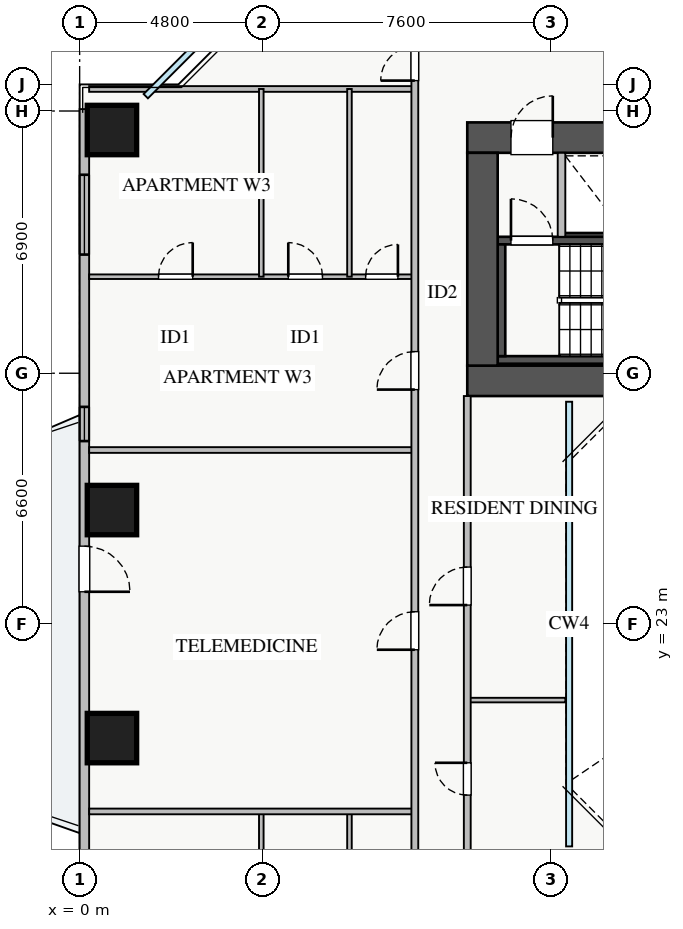
"""IFC4 building model, lengths in metres.
Left out: names, types, materials, properties, quantities, classifications, styles, units other than length and angle.
Written with IfcOpenShell. Run it as: python <this file> out.ifc"""

import sys

from ifc_helpers import new_model, si_unit, direction, frame, frame_2d, origin, origin_2d, place, context, subcontext, project, spatial, rectangle, extrude, source, transform, mapped, element, fill, save


model = new_model("IFC4")
c1 = context("Model", 3, precision=1e-05, world=origin(), true_north=direction((0.0, 1.0)))
c2 = subcontext(c1, "Body", "Model", "MODEL_VIEW")
j1 = project(units=[si_unit("LENGTHUNIT", "METRE"), si_unit("PLANEANGLEUNIT", "RADIAN")], contexts=[c1])
p1 = place(None, origin())
s1 = spatial("IfcSite", under=j1, at=p1, CompositionType="ELEMENT")
p2 = place(p1, origin())
s2 = spatial("IfcBuilding", under=s1, at=p2, CompositionType="ELEMENT")
p3 = place(p2, frame((0.0, 0.0, 50.25)))
s3 = spatial("IfcBuildingStorey", under=s2, at=p3, CompositionType="ELEMENT", Elevation=50.25)
p4 = place(p3, frame((12.68, 33.2, 0.0), z_axis=(0.0, 0.0, 1.0), x_axis=(1.0, 0.0, 0.0)))
e1 = element("IfcWall", 1, at=p4, inside=s3, PredefinedType="SHEAR", context=c2, shape_type="SweptSolid", body=[
    extrude(rectangle(XDim=1.94, YDim=0.18, at=frame_2d((0.97, 0.0))), origin(), (0.0, 0.0, 1.0), 3.07),
])
p5 = place(p3, frame((11.0, 29.95, 0.0), z_axis=(0.0, 0.0, 1.0), x_axis=(1.0, 0.0, 0.0)))
e2 = element("IfcWall", 2, at=p5, inside=s3, PredefinedType="SHEAR", context=c2, shape_type="SweptSolid", body=[
    extrude(rectangle(XDim=7.15, YDim=0.2, at=frame_2d((3.575, 0.0))), origin(), (0.0, 0.0, 1.0), 3.25),
])
p6 = place(p3, frame((11.0, 33.09, 0.0), z_axis=(0.0, 0.0, 1.0), x_axis=(1.0, 0.0, 0.0)))
e3 = element("IfcWall", 3, at=p6, inside=s3, PredefinedType="SHEAR", context=c2, shape_type="SweptSolid", body=[
    extrude(rectangle(XDim=7.15, YDim=0.2, at=frame_2d((3.575, 0.0))), origin(), (0.0, 0.0, 1.0), 3.25),
])
p7 = place(p6, frame((0.35, 0.0, 0.0)))
e4 = element("IfcOpeningElement", 4, at=p7, cuts=e3, PredefinedType="OPENING", context=c2, shape_type="SweptSolid", body=[
    extrude(rectangle(XDim=1.1, YDim=2.05, at=frame_2d((0.55, 1.025))), frame((0.0, 0.11, 0.0), z_axis=(0.0, -1.0, 0.0), x_axis=(1.0, 0.0, 0.0)), (0.0, 0.0, 1.0), 0.22),
])
p8 = place(p3, frame((11.1, 30.05, 0.0), z_axis=(0.0, 0.0, 1.0), x_axis=(0.0, 1.0, 0.0)))
e5 = element("IfcWall", 5, at=p8, inside=s3, PredefinedType="SHEAR", context=c2, shape_type="SweptSolid", body=[
    extrude(rectangle(XDim=2.94, YDim=0.2, at=frame_2d((1.47, 0.0))), origin(), (0.0, 0.0, 1.0), 3.25),
])
p9 = place(p3, frame((10.2, 29.4, 0.0), z_axis=(0.0, 0.0, 1.0), x_axis=(1.0, 0.0, 0.0)))
e6 = element("IfcWall", 6, at=p9, inside=s3, PredefinedType="SHEAR", context=c2, shape_type="SweptSolid", body=[
    extrude(rectangle(XDim=17.6, YDim=0.8, at=frame_2d((8.8, 0.0))), origin(), (0.0, 0.0, 1.0), 3.25),
])
p10 = place(p3, frame((10.2, 35.8, 0.0), z_axis=(0.0, 0.0, 1.0), x_axis=(1.0, 0.0, 0.0)))
e7 = element("IfcWall", 7, at=p10, inside=s3, PredefinedType="SHEAR", context=c2, shape_type="SweptSolid", body=[
    extrude(rectangle(XDim=17.6, YDim=0.8, at=frame_2d((8.8, 0.0))), origin(), (0.0, 0.0, 1.0), 3.25),
])
p11 = place(p10, frame((1.15, 0.0, 0.0)))
e8 = element("IfcOpeningElement", 8, at=p11, cuts=e7, PredefinedType="OPENING", context=c2, shape_type="SweptSolid", body=[
    extrude(rectangle(XDim=1.1, YDim=2.05, at=frame_2d((0.55, 1.025))), frame((0.0, 0.41, 0.0), z_axis=(0.0, -1.0, 0.0), x_axis=(1.0, 0.0, 0.0)), (0.0, 0.0, 1.0), 0.82),
])
p12 = place(p10, frame((8.3, 0.0, 0.0)))
e9 = element("IfcOpeningElement", 9, at=p12, cuts=e7, PredefinedType="OPENING", context=c2, shape_type="SweptSolid", body=[
    extrude(rectangle(XDim=1.1, YDim=2.05, at=frame_2d((0.55, 1.025))), frame((0.0, 0.41, 0.0), z_axis=(0.0, -1.0, 0.0), x_axis=(1.0, 0.0, 0.0)), (0.0, 0.0, 1.0), 0.82),
])
p13 = place(p10, frame((10.05, 0.0, 0.0)))
e10 = element("IfcOpeningElement", 10, at=p13, cuts=e7, PredefinedType="OPENING", context=c2, shape_type="SweptSolid", body=[
    extrude(rectangle(XDim=1.1, YDim=2.05, at=frame_2d((0.55, 1.025))), frame((0.0, 0.41, 0.0), z_axis=(0.0, -1.0, 0.0), x_axis=(1.0, 0.0, 0.0)), (0.0, 0.0, 1.0), 0.82),
])
p14 = place(p10, frame((14.74, 0.0, 0.0)))
e11 = element("IfcOpeningElement", 11, at=p14, cuts=e7, PredefinedType="OPENING", context=c2, shape_type="SweptSolid", body=[
    extrude(rectangle(XDim=1.0, YDim=2.05, at=frame_2d((0.5, 1.025))), frame((0.0, 0.41, 0.0), z_axis=(0.0, -1.0, 0.0), x_axis=(1.0, 0.0, 0.0)), (0.0, 0.0, 1.0), 0.82),
])
p15 = place(p10, frame((11.835, 0.0, 0.0)))
e12 = element("IfcOpeningElement", 12, at=p15, cuts=e7, PredefinedType="OPENING", context=c2, shape_type="SweptSolid", body=[
    extrude(rectangle(XDim=1.0, YDim=2.05, at=frame_2d((0.5, 1.025))), frame((0.0, 0.41, 0.0), z_axis=(0.0, -1.0, 0.0), x_axis=(1.0, 0.0, 0.0)), (0.0, 0.0, 1.0), 0.82),
])
p16 = place(p10, frame((13.37, 0.0, 0.0)))
e13 = element("IfcOpeningElement", 13, at=p16, cuts=e7, PredefinedType="OPENING", context=c2, shape_type="SweptSolid", body=[
    extrude(rectangle(XDim=1.0, YDim=2.05, at=frame_2d((0.5, 1.025))), frame((0.0, 0.41, 0.0), z_axis=(0.0, -1.0, 0.0), x_axis=(1.0, 0.0, 0.0)), (0.0, 0.0, 1.0), 0.82),
])
p17 = place(p3, frame((10.6, 29.8, 0.0), z_axis=(0.0, 0.0, 1.0), x_axis=(0.0, 1.0, 0.0)))
e14 = element("IfcWall", 14, at=p17, inside=s3, PredefinedType="SHEAR", context=c2, shape_type="SweptSolid", body=[
    extrude(rectangle(XDim=5.6, YDim=0.8, at=frame_2d((2.8, 0.0))), origin(), (0.0, 0.0, 1.0), 3.25),
])
m1 = source(origin(), c2, "Body", "SweptSolid", [
    extrude(rectangle(XDim=1.3, YDim=1.3, at=origin_2d()), origin(), (0.0, 0.0, 1.0), 3.25),
])
for number, where, z_axis, x_axis in (
    (15, (0.85, 36.0, 0.0), (0.0, 0.0, 1.0), (1.0, 0.0, 0.0)),
    (16, (0.85, 26.0, 0.0), (0.0, 0.0, 1.0), (1.0, 0.0, 0.0)),
    (17, (0.85, 20.0, 0.0), (0.0, 0.0, 1.0), (1.0, 0.0, 0.0)),
):
    element("IfcColumn", number, at=place(p3, frame(where, z_axis=z_axis, x_axis=x_axis)), inside=s3, PredefinedType="COLUMN", context=c2, shape_type="MappedRepresentation", body=[
        mapped(m1, transform((0.0, 0.0, 0.0), x_axis=(1.0, 0.0, 0.0), y_axis=(0.0, 1.0, 0.0), z_axis=(0.0, 0.0, 1.0), scale=1.0)),
    ])
p18 = place(p3, frame((0.125, 9.45, 0.0), z_axis=(0.0, 0.0, 1.0), x_axis=(0.0, 1.0, 0.0)))
e18 = element("IfcWall", 18, at=p18, inside=s3, PredefinedType="STANDARD", context=c2, shape_type="SweptSolid", body=[
    extrude(rectangle(XDim=27.1, YDim=0.25, at=frame_2d((13.55, 0.0))), origin(), (0.0, 0.0, 1.0), 2.61),
])
p19 = place(p18, frame((14.4, 0.0, 0.0)))
e19 = element("IfcOpeningElement", 19, at=p19, cuts=e18, PredefinedType="OPENING", context=c2, shape_type="SweptSolid", body=[
    extrude(rectangle(XDim=1.2, YDim=2.1, at=frame_2d((0.6, 1.05))), frame((0.0, 0.135, 0.0), z_axis=(0.0, -1.0, 0.0), x_axis=(1.0, 0.0, 0.0)), (0.0, 0.0, 1.0), 0.27),
])
p20 = place(p18, frame((1.512, 0.0, 0.9)))
e20 = element("IfcOpeningElement", 20, at=p20, cuts=e18, PredefinedType="OPENING", context=c2, shape_type="SweptSolid", body=[
    extrude(rectangle(XDim=1.8, YDim=1.5, at=frame_2d((0.9, 0.75))), frame((0.0, 0.135, 0.0), z_axis=(0.0, -1.0, 0.0), x_axis=(1.0, 0.0, 0.0)), (0.0, 0.0, 1.0), 0.27),
])
p21 = place(p18, frame((23.272, 0.0, 0.9)))
e21 = element("IfcOpeningElement", 21, at=p21, cuts=e18, PredefinedType="OPENING", context=c2, shape_type="SweptSolid", body=[
    extrude(rectangle(XDim=2.1, YDim=1.5, at=frame_2d((1.05, 0.75))), frame((0.0, 0.135, 0.0), z_axis=(0.0, -1.0, 0.0), x_axis=(1.0, 0.0, 0.0)), (0.0, 0.0, 1.0), 0.27),
])
p22 = place(p18, frame((4.942, 0.0, 0.9)))
e22 = element("IfcOpeningElement", 22, at=p22, cuts=e18, PredefinedType="OPENING", context=c2, shape_type="SweptSolid", body=[
    extrude(rectangle(XDim=2.4, YDim=1.5, at=frame_2d((1.2, 0.75))), frame((0.0, 0.135, 0.0), z_axis=(0.0, -1.0, 0.0), x_axis=(1.0, 0.0, 0.0)), (0.0, 0.0, 1.0), 0.27),
])
p23 = place(p18, frame((18.365, 0.0, 0.9)))
e23 = element("IfcOpeningElement", 23, at=p23, cuts=e18, PredefinedType="OPENING", context=c2, shape_type="SweptSolid", body=[
    extrude(rectangle(XDim=0.9, YDim=1.2, at=frame_2d((0.45, 0.6))), frame((0.0, 0.135, 0.0), z_axis=(0.0, -1.0, 0.0), x_axis=(1.0, 0.0, 0.0)), (0.0, 0.0, 1.0), 0.27),
])
p24 = place(p3, frame((12.68, 33.19, 0.0), z_axis=(0.0, 0.0, 1.0), x_axis=(0.0, 1.0, 0.0)))
e24 = element("IfcWall", 24, at=p24, inside=s3, PredefinedType="PARTITIONING", context=c2, shape_type="SweptSolid", body=[
    extrude(rectangle(XDim=2.21, YDim=0.2, at=frame_2d((1.105, 0.0))), origin(), (0.0, 0.0, 1.0), 3.07),
])
p25 = place(p3, frame((0.25, 37.08, 0.0), z_axis=(0.0, 0.0, 1.0), x_axis=(1.0, 0.0, 0.0)))
e25 = element("IfcWall", 25, at=p25, inside=s3, PredefinedType="PARTITIONING", context=c2, shape_type="SweptSolid", body=[
    extrude(rectangle(XDim=8.57, YDim=0.15, at=frame_2d((4.285, 0.0))), origin(), (0.0, 0.0, 1.0), 3.07),
])
for number, where, z_axis, x_axis in (
    (26, (4.78, 13.13, 0.0), (0.0, 0.0, 1.0), (0.0, 1.0, 0.0)),
    (27, (7.1, 13.13, 0.0), (0.0, 0.0, 1.0), (0.0, 1.0, 0.0)),
):
    element("IfcWall", number, at=place(p3, frame(where, z_axis=z_axis, x_axis=x_axis)), inside=s3, PredefinedType="PLUMBINGWALL", context=c2, shape_type="SweptSolid", body=[
        extrude(rectangle(XDim=4.94, YDim=0.12, at=frame_2d((2.47, 0.0))), origin(), (0.0, 0.0, 1.0), 3.07),
    ])
p26 = place(p3, frame((0.25, 18.07, 0.0), z_axis=(0.0, 0.0, 1.0), x_axis=(1.0, 0.0, 0.0)))
e28 = element("IfcWall", 28, at=p26, inside=s3, PredefinedType="PARTITIONING", context=c2, shape_type="SweptSolid", body=[
    extrude(rectangle(XDim=8.57, YDim=0.15, at=frame_2d((4.285, 0.0))), origin(), (0.0, 0.0, 1.0), 2.821),
])
p27 = place(p3, frame((0.25, 32.14, 0.0), z_axis=(0.0, 0.0, 1.0), x_axis=(1.0, 0.0, 0.0)))
e29 = element("IfcWall", 29, at=p27, inside=s3, PredefinedType="PLUMBINGWALL", context=c2, shape_type="SweptSolid", body=[
    extrude(rectangle(XDim=8.57, YDim=0.12, at=frame_2d((4.285, 0.0))), origin(), (0.0, 0.0, 1.0), 3.07),
])
p28 = place(p27, frame((1.825, 0.0, 0.0)))
e30 = element("IfcOpeningElement", 30, at=p28, cuts=e29, PredefinedType="OPENING", context=c2, shape_type="SweptSolid", body=[
    extrude(rectangle(XDim=0.9, YDim=2.05, at=frame_2d((0.45, 1.025))), frame((0.0, 0.07, 0.0), z_axis=(0.0, -1.0, 0.0), x_axis=(1.0, 0.0, 0.0)), (0.0, 0.0, 1.0), 0.14),
])
p29 = place(p27, frame((5.24, 0.0, 0.0)))
e31 = element("IfcOpeningElement", 31, at=p29, cuts=e29, PredefinedType="OPENING", context=c2, shape_type="SweptSolid", body=[
    extrude(rectangle(XDim=0.9, YDim=2.05, at=frame_2d((0.45, 1.025))), frame((0.0, 0.07, 0.0), z_axis=(0.0, -1.0, 0.0), x_axis=(1.0, 0.0, 0.0)), (0.0, 0.0, 1.0), 0.14),
])
p30 = place(p27, frame((7.275, 0.0, 0.0)))
e32 = element("IfcOpeningElement", 32, at=p30, cuts=e29, PredefinedType="OPENING", context=c2, shape_type="SweptSolid", body=[
    extrude(rectangle(XDim=0.85, YDim=2.05, at=frame_2d((0.425, 1.025))), frame((0.0, 0.07, 0.0), z_axis=(0.0, -1.0, 0.0), x_axis=(1.0, 0.0, 0.0)), (0.0, 0.0, 1.0), 0.14),
])
for number, where, z_axis, x_axis in (
    (33, (4.78, 32.14, 0.0), (0.0, 0.0, 1.0), (0.0, 1.0, 0.0)),
    (34, (7.1, 32.14, 0.0), (0.0, 0.0, 1.0), (0.0, 1.0, 0.0)),
):
    element("IfcWall", number, at=place(p3, frame(where, z_axis=z_axis, x_axis=x_axis)), inside=s3, PredefinedType="PLUMBINGWALL", context=c2, shape_type="SweptSolid", body=[
        extrude(rectangle(XDim=4.94, YDim=0.12, at=frame_2d((2.47, 0.0))), origin(), (0.0, 0.0, 1.0), 3.07),
    ])
p31 = place(p3, frame((0.25, 27.58, 0.0), z_axis=(0.0, 0.0, 1.0), x_axis=(1.0, 0.0, 0.0)))
e35 = element("IfcWall", 35, at=p31, inside=s3, PredefinedType="PARTITIONING", context=c2, shape_type="SweptSolid", body=[
    extrude(rectangle(XDim=8.57, YDim=0.15, at=frame_2d((4.285, 0.0))), origin(), (0.0, 0.0, 1.0), 2.821),
])
p32 = place(p3, frame((8.82, 7.21, 0.0), z_axis=(0.0, 0.0, 1.0), x_axis=(0.0, 1.0, 0.0)))
e36 = element("IfcWall", 36, at=p32, inside=s3, PredefinedType="PARTITIONING", context=c2, shape_type="SweptSolid", body=[
    extrude(rectangle(XDim=31.23, YDim=0.18, at=frame_2d((15.615, 0.0))), origin(), (0.0, 0.0, 1.0), 3.07),
])
p33 = place(p32, frame((30.09, 0.0, 0.0)))
e37 = element("IfcOpeningElement", 37, at=p33, cuts=e36, PredefinedType="OPENING", context=c2, shape_type="SweptSolid", body=[
    extrude(rectangle(XDim=0.9, YDim=2.05, at=frame_2d((0.45, 1.025))), frame((0.0, 0.1, 0.0), z_axis=(0.0, -1.0, 0.0), x_axis=(1.0, 0.0, 0.0)), (0.0, 0.0, 1.0), 0.2),
])
p34 = place(p32, frame((0.24, 0.0, 0.0)))
e38 = element("IfcOpeningElement", 38, at=p34, cuts=e36, PredefinedType="OPENING", context=c2, shape_type="SweptSolid", body=[
    extrude(rectangle(XDim=0.9, YDim=2.05, at=frame_2d((0.45, 1.025))), frame((0.0, 0.1, 0.0), z_axis=(0.0, -1.0, 0.0), x_axis=(1.0, 0.0, 0.0)), (0.0, 0.0, 1.0), 0.2),
])
p35 = place(p32, frame((2.95, 0.0, 0.0)))
e39 = element("IfcOpeningElement", 39, at=p35, cuts=e36, PredefinedType="OPENING", context=c2, shape_type="SweptSolid", body=[
    extrude(rectangle(XDim=1.0, YDim=2.05, at=frame_2d((0.5, 1.025))), frame((0.0, 0.1, 0.0), z_axis=(0.0, -1.0, 0.0), x_axis=(1.0, 0.0, 0.0)), (0.0, 0.0, 1.0), 0.2),
])
p36 = place(p32, frame((15.115, 0.0, 0.0)))
e40 = element("IfcOpeningElement", 40, at=p36, cuts=e36, PredefinedType="OPENING", context=c2, shape_type="SweptSolid", body=[
    extrude(rectangle(XDim=1.0, YDim=2.05, at=frame_2d((0.5, 1.025))), frame((0.0, 0.1, 0.0), z_axis=(0.0, -1.0, 0.0), x_axis=(1.0, 0.0, 0.0)), (0.0, 0.0, 1.0), 0.2),
])
p37 = place(p32, frame((21.96, 0.0, 0.0)))
e41 = element("IfcOpeningElement", 41, at=p37, cuts=e36, PredefinedType="OPENING", context=c2, shape_type="SweptSolid", body=[
    extrude(rectangle(XDim=1.0, YDim=2.05, at=frame_2d((0.5, 1.025))), frame((0.0, 0.1, 0.0), z_axis=(0.0, -1.0, 0.0), x_axis=(1.0, 0.0, 0.0)), (0.0, 0.0, 1.0), 0.2),
])
p38 = place(p3, frame((10.2, 21.0, 0.0), z_axis=(0.0, 0.0, 1.0), x_axis=(1.0, 0.0, 0.0)))
e42 = element("IfcWall", 42, at=p38, inside=s3, PredefinedType="PLUMBINGWALL", context=c2, shape_type="SweptSolid", body=[
    extrude(rectangle(XDim=2.58, YDim=0.12, at=frame_2d((1.29, 0.0))), origin(), (0.0, 0.0, 1.0), 3.07),
])
p39 = place(p3, frame((10.2, 17.0, 0.0), z_axis=(0.0, 0.0, 1.0), x_axis=(0.0, 1.0, 0.0)))
e43 = element("IfcWall", 43, at=p39, inside=s3, PredefinedType="PARTITIONING", context=c2, shape_type="SweptSolid", body=[
    extrude(rectangle(XDim=12.0, YDim=0.18, at=frame_2d((6.0, 0.0))), origin(), (0.0, 0.0, 1.0), 3.07),
])
p40 = place(p39, frame((1.5, 0.0, 0.0)))
e44 = element("IfcOpeningElement", 44, at=p40, cuts=e43, PredefinedType="OPENING", context=c2, shape_type="SweptSolid", body=[
    extrude(rectangle(XDim=0.85, YDim=2.05, at=frame_2d((0.425, 1.025))), frame((0.0, 0.1, 0.0), z_axis=(0.0, -1.0, 0.0), x_axis=(1.0, 0.0, 0.0)), (0.0, 0.0, 1.0), 0.2),
])
p41 = place(p39, frame((6.5, 0.0, 0.0)))
e45 = element("IfcOpeningElement", 45, at=p41, cuts=e43, PredefinedType="OPENING", context=c2, shape_type="SweptSolid", body=[
    extrude(rectangle(XDim=1.0, YDim=2.05, at=frame_2d((0.5, 1.025))), frame((0.0, 0.1, 0.0), z_axis=(0.0, -1.0, 0.0), x_axis=(1.0, 0.0, 0.0)), (0.0, 0.0, 1.0), 0.2),
])
m2 = source(origin(), c2, "Body", "SweptSolid", [
    extrude(rectangle(XDim=1.2, YDim=2.1, at=frame_2d((0.6, 1.05))), frame((0.0, 0.025, 0.0), z_axis=(0.0, -1.0, 0.0), x_axis=(1.0, 0.0, 0.0)), (0.0, 0.0, 1.0), 0.05),
])
p42 = place(p19, frame((1.2, 0.0, 0.0), z_axis=(0.0, 0.0, 1.0), x_axis=(-1.0, 0.0, 0.0)))
e46 = element("IfcDoor", 46, at=p42, inside=s3, OperationType="SINGLE_SWING_LEFT", PredefinedType="DOOR", context=c2, shape_type="MappedRepresentation", body=[
    mapped(m2, transform((0.0, 0.0, 0.0), x_axis=(1.0, 0.0, 0.0), y_axis=(0.0, 1.0, 0.0), z_axis=(0.0, 0.0, 1.0), scale=1.0)),
])
fill(e19, e46)
m3 = source(origin(), c2, "Body", "SweptSolid", [
    extrude(rectangle(XDim=2.1, YDim=1.5, at=frame_2d((1.05, 0.75))), frame((0.0, 0.03, 0.0), z_axis=(0.0, -1.0, 0.0), x_axis=(1.0, 0.0, 0.0)), (0.0, 0.0, 1.0), 0.06),
])
p43 = place(p21, origin())
e47 = element("IfcWindow", 47, at=p43, inside=s3, PartitioningType="TRIPLE_PANEL_VERTICAL", PredefinedType="WINDOW", context=c2, shape_type="MappedRepresentation", body=[
    mapped(m3, transform((0.0, 0.0, 0.0), x_axis=(1.0, 0.0, 0.0), y_axis=(0.0, 1.0, 0.0), z_axis=(0.0, 0.0, 1.0), scale=1.0)),
])
fill(e21, e47)
m4 = source(origin(), c2, "Body", "SweptSolid", [
    extrude(rectangle(XDim=1.1, YDim=2.05, at=frame_2d((0.55, 1.025))), frame((0.0, 0.025, 0.0), z_axis=(0.0, -1.0, 0.0), x_axis=(1.0, 0.0, 0.0)), (0.0, 0.0, 1.0), 0.05),
])
p44 = place(p11, origin())
e48 = element("IfcDoor", 48, at=p44, inside=s3, OperationType="SINGLE_SWING_RIGHT", PredefinedType="DOOR", context=c2, shape_type="MappedRepresentation", body=[
    mapped(m4, transform((0.0, 0.0, 0.0), x_axis=(1.0, 0.0, 0.0), y_axis=(0.0, 1.0, 0.0), z_axis=(0.0, 0.0, 1.0), scale=1.0)),
])
fill(e8, e48)
p45 = place(p7, origin())
e49 = element("IfcDoor", 49, at=p45, inside=s3, OperationType="SINGLE_SWING_LEFT", PredefinedType="DOOR", context=c2, shape_type="MappedRepresentation", body=[
    mapped(m4, transform((0.0, 0.0, 0.0), x_axis=(1.0, 0.0, 0.0), y_axis=(0.0, 1.0, 0.0), z_axis=(0.0, 0.0, 1.0), scale=1.0)),
])
fill(e4, e49)
m5 = source(origin(), c2, "Body", "SweptSolid", [
    extrude(rectangle(XDim=0.9, YDim=2.05, at=frame_2d((0.45, 1.025))), frame((0.0, 0.025, 0.0), z_axis=(0.0, -1.0, 0.0), x_axis=(1.0, 0.0, 0.0)), (0.0, 0.0, 1.0), 0.05),
])
p46 = place(p28, origin())
e50 = element("IfcDoor", 50, at=p46, inside=s3, OperationType="SINGLE_SWING_RIGHT", PredefinedType="DOOR", context=c2, shape_type="MappedRepresentation", body=[
    mapped(m5, transform((0.0, 0.0, 0.0), x_axis=(1.0, 0.0, 0.0), y_axis=(0.0, 1.0, 0.0), z_axis=(0.0, 0.0, 1.0), scale=1.0)),
])
fill(e30, e50)
p47 = place(p29, origin())
e51 = element("IfcDoor", 51, at=p47, inside=s3, OperationType="SINGLE_SWING_LEFT", PredefinedType="DOOR", context=c2, shape_type="MappedRepresentation", body=[
    mapped(m5, transform((0.0, 0.0, 0.0), x_axis=(1.0, 0.0, 0.0), y_axis=(0.0, 1.0, 0.0), z_axis=(0.0, 0.0, 1.0), scale=1.0)),
])
fill(e31, e51)
m6 = source(origin(), c2, "Body", "SweptSolid", [
    extrude(rectangle(XDim=0.85, YDim=2.05, at=frame_2d((0.425, 1.025))), frame((0.0, 0.025, 0.0), z_axis=(0.0, -1.0, 0.0), x_axis=(1.0, 0.0, 0.0)), (0.0, 0.0, 1.0), 0.05),
])
p48 = place(p30, origin())
e52 = element("IfcDoor", 52, at=p48, inside=s3, OperationType="SINGLE_SWING_RIGHT", PredefinedType="DOOR", context=c2, shape_type="MappedRepresentation", body=[
    mapped(m6, transform((0.0, 0.0, 0.0), x_axis=(1.0, 0.0, 0.0), y_axis=(0.0, 1.0, 0.0), z_axis=(0.0, 0.0, 1.0), scale=1.0)),
])
fill(e32, e52)
p49 = place(p33, origin())
e53 = element("IfcDoor", 53, at=p49, inside=s3, OperationType="SINGLE_SWING_LEFT", PredefinedType="DOOR", context=c2, shape_type="MappedRepresentation", body=[
    mapped(m5, transform((0.0, 0.0, 0.0), x_axis=(1.0, 0.0, 0.0), y_axis=(0.0, 1.0, 0.0), z_axis=(0.0, 0.0, 1.0), scale=1.0)),
])
fill(e37, e53)
m7 = source(origin(), c2, "Body", "SweptSolid", [
    extrude(rectangle(XDim=1.0, YDim=2.05, at=frame_2d((0.5, 1.025))), frame((0.0, 0.025, 0.0), z_axis=(0.0, -1.0, 0.0), x_axis=(1.0, 0.0, 0.0)), (0.0, 0.0, 1.0), 0.05),
])
p50 = place(p36, origin())
e54 = element("IfcDoor", 54, at=p50, inside=s3, OperationType="SINGLE_SWING_LEFT", PredefinedType="DOOR", context=c2, shape_type="MappedRepresentation", body=[
    mapped(m7, transform((0.0, 0.0, 0.0), x_axis=(1.0, 0.0, 0.0), y_axis=(0.0, 1.0, 0.0), z_axis=(0.0, 0.0, 1.0), scale=1.0)),
])
fill(e40, e54)
p51 = place(p37, origin())
e55 = element("IfcDoor", 55, at=p51, inside=s3, OperationType="SINGLE_SWING_LEFT", PredefinedType="DOOR", context=c2, shape_type="MappedRepresentation", body=[
    mapped(m7, transform((0.0, 0.0, 0.0), x_axis=(1.0, 0.0, 0.0), y_axis=(0.0, 1.0, 0.0), z_axis=(0.0, 0.0, 1.0), scale=1.0)),
])
fill(e41, e55)
p52 = place(p40, origin())
e56 = element("IfcDoor", 56, at=p52, inside=s3, OperationType="SINGLE_SWING_RIGHT", PredefinedType="DOOR", context=c2, shape_type="MappedRepresentation", body=[
    mapped(m6, transform((0.0, 0.0, 0.0), x_axis=(1.0, 0.0, 0.0), y_axis=(0.0, 1.0, 0.0), z_axis=(0.0, 0.0, 1.0), scale=1.0)),
])
fill(e44, e56)
p53 = place(p41, origin())
e57 = element("IfcDoor", 57, at=p53, inside=s3, OperationType="SINGLE_SWING_LEFT", PredefinedType="DOOR", context=c2, shape_type="MappedRepresentation", body=[
    mapped(m7, transform((0.0, 0.0, 0.0), x_axis=(1.0, 0.0, 0.0), y_axis=(0.0, 1.0, 0.0), z_axis=(0.0, 0.0, 1.0), scale=1.0)),
])
fill(e45, e57)
m8 = source(origin(), c2, "Body", "SweptSolid", [
    extrude(rectangle(XDim=0.9, YDim=1.2, at=frame_2d((0.45, 0.6))), frame((0.0, 0.03, 0.0), z_axis=(0.0, -1.0, 0.0), x_axis=(1.0, 0.0, 0.0)), (0.0, 0.0, 1.0), 0.06),
])
p54 = place(p23, origin())
e58 = element("IfcWindow", 58, at=p54, inside=s3, PartitioningType="SINGLE_PANEL", PredefinedType="WINDOW", context=c2, shape_type="MappedRepresentation", body=[
    mapped(m8, transform((0.0, 0.0, 0.0), x_axis=(1.0, 0.0, 0.0), y_axis=(0.0, 1.0, 0.0), z_axis=(0.0, 0.0, 1.0), scale=1.0)),
])
fill(e23, e58)
save(model, sys.argv[1])
